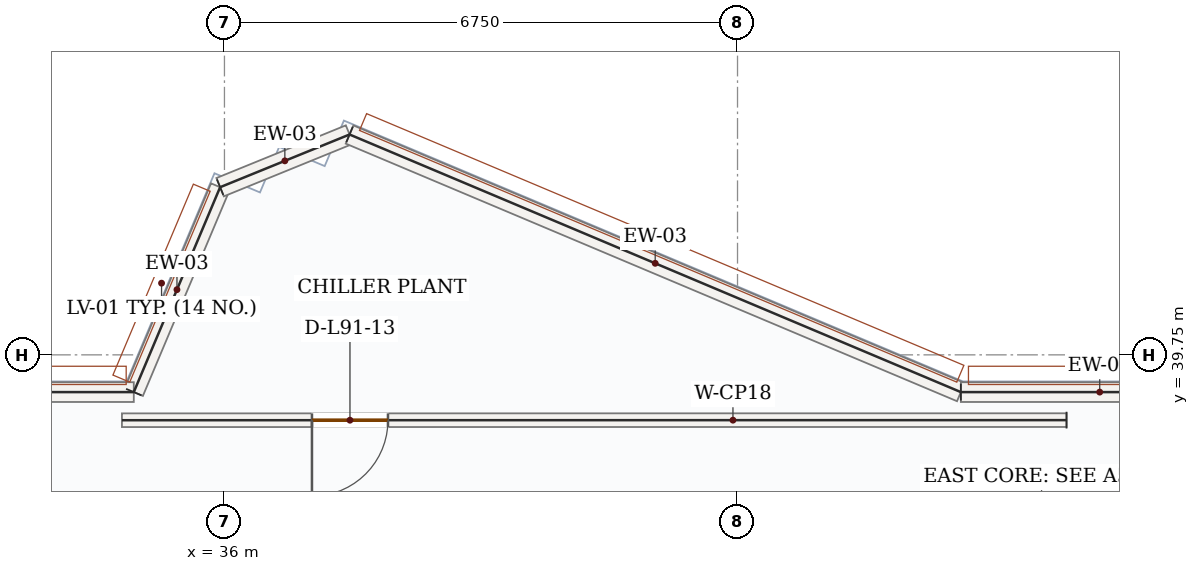
"""IFC4 building model, lengths in metres.
Left out: names, types, materials, properties, quantities, classifications, styles, units other than length and angle.
Written with IfcOpenShell. Run it as: python <this file> out.ifc"""

import sys

from ifc_helpers import new_model, si_unit, direction, frame, frame_2d, origin, place, context, subcontext, project, spatial, rectangle, extrude, source, transform, mapped, element, fill, save


model = new_model("IFC4")
c1 = context("Model", 3, precision=1e-05, world=origin(), true_north=direction((0.0, 1.0)))
c2 = subcontext(c1, "Body", "Model", "MODEL_VIEW")
j1 = project(units=[si_unit("LENGTHUNIT", "METRE"), si_unit("PLANEANGLEUNIT", "RADIAN")], contexts=[c1])
p1 = place(None, origin())
s1 = spatial("IfcSite", under=j1, at=p1, CompositionType="ELEMENT")
p2 = place(p1, origin())
s2 = spatial("IfcBuilding", under=s1, at=p2, CompositionType="ELEMENT")
p3 = place(p2, frame((0.0, 0.0, 375.15)))
s3 = spatial("IfcBuildingStorey", under=s2, at=p3, CompositionType="ELEMENT", Elevation=375.15)
m1 = source(origin(), c2, "Body", "SweptSolid", [
    extrude(rectangle(XDim=2.925, YDim=0.26, at=frame_2d((1.463, 0.0))), origin(), (0.0, 0.0, 1.0), 4.25),
])
p4 = place(p3, frame((34.807, 39.26, 0.0), z_axis=(0.0, 0.0, 1.0), x_axis=(0.388321883953, 0.921523800259, 0.0)))
e1 = element("IfcWall", 1, at=p4, inside=s3, PredefinedType="SOLIDWALL", context=c2, shape_type="MappedRepresentation", body=[
    mapped(m1, transform((0.0, 0.0, 0.0), x_axis=(1.0, 0.0, 0.0), y_axis=(0.0, 1.0, 0.0), z_axis=(0.0, 0.0, 1.0), scale=1.0)),
])
m2 = source(origin(), c2, "Body", "SweptSolid", [
    extrude(rectangle(XDim=1.839, YDim=0.26, at=frame_2d((0.919, 0.0))), origin(), (0.0, 0.0, 1.0), 4.25),
])
p5 = place(p3, frame((35.943, 41.956, 0.0), z_axis=(0.0, 0.0, 1.0), x_axis=(0.926216039781, 0.376993166586, 0.0)))
e2 = element("IfcWall", 2, at=p5, inside=s3, PredefinedType="SOLIDWALL", context=c2, shape_type="MappedRepresentation", body=[
    mapped(m2, transform((0.0, 0.0, 0.0), x_axis=(1.0, 0.0, 0.0), y_axis=(0.0, 1.0, 0.0), z_axis=(0.0, 0.0, 1.0), scale=1.0)),
])
m3 = source(origin(), c2, "Body", "SweptSolid", [
    extrude(rectangle(XDim=8.727, YDim=0.26, at=frame_2d((4.364, 0.0))), origin(), (0.0, 0.0, 1.0), 4.25),
])
p6 = place(p3, frame((37.646, 42.649, 0.0), z_axis=(0.0, 0.0, 1.0), x_axis=(0.921524227272, -0.38832087061, 0.0)))
e3 = element("IfcWall", 3, at=p6, inside=s3, PredefinedType="SOLIDWALL", context=c2, shape_type="MappedRepresentation", body=[
    mapped(m3, transform((0.0, 0.0, 0.0), x_axis=(1.0, 0.0, 0.0), y_axis=(0.0, 1.0, 0.0), z_axis=(0.0, 0.0, 1.0), scale=1.0)),
])
m4 = source(origin(), c2, "Body", "SweptSolid", [
    extrude(rectangle(XDim=3.654, YDim=0.26, at=frame_2d((1.827, 0.0))), origin(), (0.0, 0.0, 1.0), 4.25),
])
p7 = place(p3, frame((45.688, 39.26, 0.0), z_axis=(0.0, 0.0, 1.0), x_axis=(1.0, 0.0, 0.0)))
e4 = element("IfcWall", 4, at=p7, inside=s3, PredefinedType="SOLIDWALL", context=c2, shape_type="MappedRepresentation", body=[
    mapped(m4, transform((0.0, 0.0, 0.0), x_axis=(1.0, 0.0, 0.0), y_axis=(0.0, 1.0, 0.0), z_axis=(0.0, 0.0, 1.0), scale=1.0)),
])
m5 = source(origin(), c2, "Body", "SweptSolid", [
    extrude(rectangle(XDim=12.149, YDim=0.26, at=frame_2d((6.075, 0.0))), origin(), (0.0, 0.0, 1.0), 4.25),
])
p8 = place(p3, frame((22.658, 39.26, 0.0), z_axis=(0.0, 0.0, 1.0), x_axis=(1.0, 0.0, 0.0)))
e5 = element("IfcWall", 5, at=p8, inside=s3, PredefinedType="SOLIDWALL", context=c2, shape_type="MappedRepresentation", body=[
    mapped(m5, transform((0.0, 0.0, 0.0), x_axis=(1.0, 0.0, 0.0), y_axis=(0.0, 1.0, 0.0), z_axis=(0.0, 0.0, 1.0), scale=1.0)),
])
p9 = place(p3, frame((47.079, 38.891, 0.0), z_axis=(0.0, 0.0, 1.0), x_axis=(-0.999999995176, -9.8227967e-05, 0.0)))
e6 = element("IfcWall", 6, at=p9, inside=s3, PredefinedType="PARTITIONING", context=c2, shape_type="SweptSolid", body=[
    extrude(rectangle(XDim=12.427, YDim=0.18, at=frame_2d((6.214, 0.0))), origin(), (0.0, 0.0, 1.0), 4.25),
])
p10 = place(p9, frame((8.927, 0.0, 0.0)))
e7 = element("IfcOpeningElement", 7, at=p10, cuts=e6, PredefinedType="OPENING", context=c2, shape_type="SweptSolid", body=[
    extrude(rectangle(XDim=1.0, YDim=2.15, at=frame_2d((0.5, 1.075))), frame((0.0, 0.1, 0.0), z_axis=(0.0, -1.0, 0.0), x_axis=(1.0, 0.0, 0.0)), (0.0, 0.0, 1.0), 0.2),
])
m6 = source(origin(), c2, "Body", "SweptSolid", [
    extrude(rectangle(XDim=1.0, YDim=2.15, at=frame_2d((0.5, 1.075))), frame((0.0, 0.025, 0.0), z_axis=(0.0, -1.0, 0.0), x_axis=(1.0, 0.0, 0.0)), (0.0, 0.0, 1.0), 0.05),
])
p11 = place(p10, origin())
e8 = element("IfcDoor", 8, at=p11, inside=s3, OperationType="SINGLE_SWING_RIGHT", PredefinedType="DOOR", context=c2, shape_type="MappedRepresentation", body=[
    mapped(m6, transform((0.0, 0.0, 0.0), x_axis=(1.0, 0.0, 0.0), y_axis=(0.0, 1.0, 0.0), z_axis=(0.0, 0.0, 1.0), scale=1.0)),
])
fill(e7, e8)
save(model, sys.argv[1])
